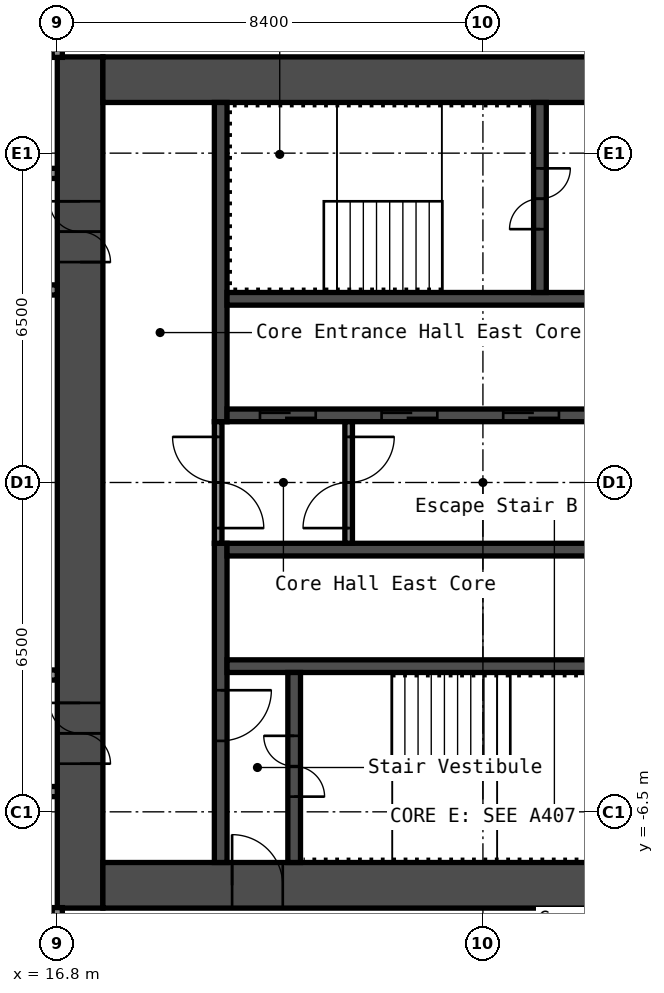
"""IFC4 building model, lengths in metres.
Left out: names, types, materials, properties, quantities, classifications, styles, units other than length and angle.
Written with IfcOpenShell. Run it as: python <this file> out.ifc"""

import sys

from ifc_helpers import new_model, si_unit, direction, frame, frame_2d, origin, place, context, subcontext, project, spatial, rectangle, extrude, element, fill, save


model = new_model("IFC4")
c1 = context("Model", 3, precision=1e-05, world=origin(), true_north=direction((0.0, 1.0)))
c2 = subcontext(c1, "Body", "Model", "MODEL_VIEW")
j1 = project(units=[si_unit("LENGTHUNIT", "METRE"), si_unit("PLANEANGLEUNIT", "RADIAN")], contexts=[c1])
p1 = place(None, origin())
s1 = spatial("IfcSite", under=j1, at=p1, CompositionType="ELEMENT")
p2 = place(p1, origin())
s2 = spatial("IfcBuilding", under=s1, at=p2, CompositionType="ELEMENT")
p3 = place(p2, frame((0.0, 0.0, 51.8)))
s3 = spatial("IfcBuildingStorey", under=s2, at=p3, CompositionType="ELEMENT", Elevation=51.8)
p4 = place(p3, frame((17.25, -8.4, 0.0), z_axis=(0.0, 0.0, 1.0), x_axis=(0.0, 1.0, 0.0)))
e1 = element("IfcWall", 1, at=p4, inside=s3, PredefinedType="SHEAR", context=c2, shape_type="SweptSolid", body=[
    extrude(rectangle(XDim=16.8, YDim=0.9, at=frame_2d((8.4, 0.0))), origin(), (0.0, 0.0, 1.0), 2.8),
])
p5 = place(p4, frame((12.75, 0.0, 0.0)))
e2 = element("IfcOpeningElement", 2, at=p5, cuts=e1, PredefinedType="OPENING", context=c2, shape_type="SweptSolid", body=[
    extrude(rectangle(XDim=1.2, YDim=2.1, at=frame_2d((0.6, 1.05))), frame((0.0, 0.46, 0.0), z_axis=(0.0, -1.0, 0.0), x_axis=(1.0, 0.0, 0.0)), (0.0, 0.0, 1.0), 0.92),
])
p6 = place(p4, frame((2.85, 0.0, 0.0)))
e3 = element("IfcOpeningElement", 3, at=p6, cuts=e1, PredefinedType="OPENING", context=c2, shape_type="SweptSolid", body=[
    extrude(rectangle(XDim=1.2, YDim=2.1, at=frame_2d((0.6, 1.05))), frame((0.0, 0.46, 0.0), z_axis=(0.0, -1.0, 0.0), x_axis=(1.0, 0.0, 0.0)), (0.0, 0.0, 1.0), 0.92),
])
p7 = place(p3, frame((17.7, 7.95, 0.0), z_axis=(0.0, 0.0, 1.0), x_axis=(1.0, 0.0, 0.0)))
e4 = element("IfcWall", 4, at=p7, inside=s3, PredefinedType="SHEAR", context=c2, shape_type="SweptSolid", body=[
    extrude(rectangle(XDim=15.0, YDim=0.9, at=frame_2d((7.5, 0.0))), origin(), (0.0, 0.0, 1.0), 2.8),
])
p8 = place(p7, frame((10.4, 0.0, 0.0)))
e5 = element("IfcOpeningElement", 5, at=p8, cuts=e4, PredefinedType="OPENING", context=c2, shape_type="SweptSolid", body=[
    extrude(rectangle(XDim=1.2, YDim=2.1, at=frame_2d((0.6, 1.05))), frame((0.0, 0.46, 0.0), z_axis=(0.0, -1.0, 0.0), x_axis=(1.0, 0.0, 0.0)), (0.0, 0.0, 1.0), 0.92),
])
p9 = place(p7, frame((13.35, 0.0, 0.0)))
e6 = element("IfcOpeningElement", 6, at=p9, cuts=e4, PredefinedType="OPENING", context=c2, shape_type="SweptSolid", body=[
    extrude(rectangle(XDim=0.9, YDim=2.1, at=frame_2d((0.45, 1.05))), frame((0.0, 0.46, 0.0), z_axis=(0.0, -1.0, 0.0), x_axis=(1.0, 0.0, 0.0)), (0.0, 0.0, 1.0), 0.92),
])
p10 = place(p3, frame((17.7, -7.95, 0.0), z_axis=(0.0, 0.0, 1.0), x_axis=(1.0, 0.0, 0.0)))
e7 = element("IfcWall", 7, at=p10, inside=s3, PredefinedType="SHEAR", context=c2, shape_type="SweptSolid", body=[
    extrude(rectangle(XDim=15.0, YDim=0.9, at=frame_2d((7.5, 0.0))), origin(), (0.0, 0.0, 1.0), 2.8),
])
p11 = place(p10, frame((2.55, 0.0, 0.0)))
e8 = element("IfcOpeningElement", 8, at=p11, cuts=e7, PredefinedType="OPENING", context=c2, shape_type="SweptSolid", body=[
    extrude(rectangle(XDim=1.0, YDim=2.1, at=frame_2d((0.5, 1.05))), frame((0.0, 0.46, 0.0), z_axis=(0.0, -1.0, 0.0), x_axis=(1.0, 0.0, 0.0)), (0.0, 0.0, 1.0), 0.92),
])
p12 = place(p3, frame((20.025, 1.2, 0.0), z_axis=(0.0, 0.0, 1.0), x_axis=(0.0, 1.0, 0.0)))
e9 = element("IfcWall", 9, at=p12, inside=s3, PredefinedType="SHEAR", context=c2, shape_type="SweptSolid", body=[
    extrude(rectangle(XDim=6.3, YDim=0.25, at=frame_2d((3.15, 0.0))), origin(), (0.0, 0.0, 1.0), 2.8),
])
p13 = place(p3, frame((20.025, -7.5, 0.0), z_axis=(0.0, 0.0, 1.0), x_axis=(0.0, 1.0, 0.0)))
e10 = element("IfcWall", 10, at=p13, inside=s3, PredefinedType="SHEAR", context=c2, shape_type="SweptSolid", body=[
    extrude(rectangle(XDim=6.3, YDim=0.25, at=frame_2d((3.15, 0.0))), origin(), (0.0, 0.0, 1.0), 2.8),
])
p14 = place(p13, frame((2.4, 0.0, 0.0)))
e11 = element("IfcOpeningElement", 11, at=p14, cuts=e10, PredefinedType="OPENING", context=c2, shape_type="SweptSolid", body=[
    extrude(rectangle(XDim=1.0, YDim=2.1, at=frame_2d((0.5, 1.05))), frame((0.0, 0.135, 0.0), z_axis=(0.0, -1.0, 0.0), x_axis=(1.0, 0.0, 0.0)), (0.0, 0.0, 1.0), 0.27),
])
p15 = place(p3, frame((20.15, 1.325, 0.0), z_axis=(0.0, 0.0, 1.0), x_axis=(1.0, 0.0, 0.0)))
e12 = element("IfcWall", 12, at=p15, inside=s3, PredefinedType="SHEAR", context=c2, shape_type="SweptSolid", body=[
    extrude(rectangle(XDim=7.5, YDim=0.25, at=frame_2d((3.75, 0.0))), origin(), (0.0, 0.0, 1.0), 2.8),
])
p16 = place(p15, frame((0.65, 0.0, 0.0)))
e13 = element("IfcOpeningElement", 13, at=p16, cuts=e12, PredefinedType="OPENING", context=c2, shape_type="SweptSolid", body=[
    extrude(rectangle(XDim=1.1, YDim=2.1, at=frame_2d((0.55, 1.05))), frame((0.0, 0.135, 0.0), z_axis=(0.0, -1.0, 0.0), x_axis=(1.0, 0.0, 0.0)), (0.0, 0.0, 1.0), 0.27),
])
p17 = place(p15, frame((3.05, 0.0, 0.0)))
e14 = element("IfcOpeningElement", 14, at=p17, cuts=e12, PredefinedType="OPENING", context=c2, shape_type="SweptSolid", body=[
    extrude(rectangle(XDim=1.1, YDim=2.1, at=frame_2d((0.55, 1.05))), frame((0.0, 0.135, 0.0), z_axis=(0.0, -1.0, 0.0), x_axis=(1.0, 0.0, 0.0)), (0.0, 0.0, 1.0), 0.27),
])
p18 = place(p15, frame((5.45, 0.0, 0.0)))
e15 = element("IfcOpeningElement", 15, at=p18, cuts=e12, PredefinedType="OPENING", context=c2, shape_type="SweptSolid", body=[
    extrude(rectangle(XDim=1.1, YDim=2.1, at=frame_2d((0.55, 1.05))), frame((0.0, 0.135, 0.0), z_axis=(0.0, -1.0, 0.0), x_axis=(1.0, 0.0, 0.0)), (0.0, 0.0, 1.0), 0.27),
])
p19 = place(p3, frame((20.15, 3.625, 0.0), z_axis=(0.0, 0.0, 1.0), x_axis=(1.0, 0.0, 0.0)))
e16 = element("IfcWall", 16, at=p19, inside=s3, PredefinedType="SHEAR", context=c2, shape_type="SweptSolid", body=[
    extrude(rectangle(XDim=7.5, YDim=0.25, at=frame_2d((3.75, 0.0))), origin(), (0.0, 0.0, 1.0), 2.8),
])
p20 = place(p3, frame((26.325, 3.75, 0.0), z_axis=(0.0, 0.0, 1.0), x_axis=(0.0, 1.0, 0.0)))
e17 = element("IfcWall", 17, at=p20, inside=s3, PredefinedType="SHEAR", context=c2, shape_type="SweptSolid", body=[
    extrude(rectangle(XDim=3.75, YDim=0.25, at=frame_2d((1.875, 0.0))), origin(), (0.0, 0.0, 1.0), 2.8),
])
p21 = place(p20, frame((1.25, 0.0, 0.0)))
e18 = element("IfcOpeningElement", 18, at=p21, cuts=e17, PredefinedType="OPENING", context=c2, shape_type="SweptSolid", body=[
    extrude(rectangle(XDim=1.2, YDim=2.1, at=frame_2d((0.6, 1.05))), frame((0.0, 0.135, 0.0), z_axis=(0.0, -1.0, 0.0), x_axis=(1.0, 0.0, 0.0)), (0.0, 0.0, 1.0), 0.27),
])
for number, where, z_axis, x_axis in (
    (19, (20.15, -1.325, 0.0), (0.0, 0.0, 1.0), (1.0, 0.0, 0.0)),
    (20, (20.15, -3.625, 0.0), (0.0, 0.0, 1.0), (1.0, 0.0, 0.0)),
):
    element("IfcWall", number, at=place(p3, frame(where, z_axis=z_axis, x_axis=x_axis)), inside=s3, PredefinedType="SHEAR", context=c2, shape_type="SweptSolid", body=[
        extrude(rectangle(XDim=7.5, YDim=0.25, at=frame_2d((3.75, 0.0))), origin(), (0.0, 0.0, 1.0), 2.8),
    ])
p22 = place(p3, frame((21.475, -7.5, 0.0), z_axis=(0.0, 0.0, 1.0), x_axis=(0.0, 1.0, 0.0)))
e21 = element("IfcWall", 21, at=p22, inside=s3, PredefinedType="SHEAR", context=c2, shape_type="SweptSolid", body=[
    extrude(rectangle(XDim=3.75, YDim=0.25, at=frame_2d((1.875, 0.0))), origin(), (0.0, 0.0, 1.0), 2.8),
])
p23 = place(p22, frame((1.3, 0.0, 0.0)))
e22 = element("IfcOpeningElement", 22, at=p23, cuts=e21, PredefinedType="OPENING", context=c2, shape_type="SweptSolid", body=[
    extrude(rectangle(XDim=1.2, YDim=2.1, at=frame_2d((0.6, 1.05))), frame((0.0, 0.135, 0.0), z_axis=(0.0, -1.0, 0.0), x_axis=(1.0, 0.0, 0.0)), (0.0, 0.0, 1.0), 0.27),
])
p24 = place(p3, frame((19.975, -1.2, 0.0), z_axis=(0.0, 0.0, 1.0), x_axis=(0.0, 1.0, 0.0)))
e23 = element("IfcWall", 23, at=p24, inside=s3, PredefinedType="PARTITIONING", context=c2, shape_type="SweptSolid", body=[
    extrude(rectangle(XDim=2.4, YDim=0.15, at=frame_2d((1.2, 0.0))), origin(), (0.0, 0.0, 1.0), 2.8),
])
p25 = place(p24, frame((0.3, 0.0, 0.0)))
e24 = element("IfcOpeningElement", 24, at=p25, cuts=e23, PredefinedType="OPENING", context=c2, shape_type="SweptSolid", body=[
    extrude(rectangle(XDim=1.8, YDim=2.1, at=frame_2d((0.9, 1.05))), frame((0.0, 0.085, 0.0), z_axis=(0.0, -1.0, 0.0), x_axis=(1.0, 0.0, 0.0)), (0.0, 0.0, 1.0), 0.17),
])
p26 = place(p3, frame((22.55, -1.2, 0.0), z_axis=(0.0, 0.0, 1.0), x_axis=(0.0, 1.0, 0.0)))
e25 = element("IfcWall", 25, at=p26, inside=s3, PredefinedType="PARTITIONING", context=c2, shape_type="SweptSolid", body=[
    extrude(rectangle(XDim=2.4, YDim=0.15, at=frame_2d((1.2, 0.0))), origin(), (0.0, 0.0, 1.0), 2.8),
])
p27 = place(p26, frame((0.3, 0.0, 0.0)))
e26 = element("IfcOpeningElement", 26, at=p27, cuts=e25, PredefinedType="OPENING", context=c2, shape_type="SweptSolid", body=[
    extrude(rectangle(XDim=1.8, YDim=2.1, at=frame_2d((0.9, 1.05))), frame((0.0, 0.085, 0.0), z_axis=(0.0, -1.0, 0.0), x_axis=(1.0, 0.0, 0.0)), (0.0, 0.0, 1.0), 0.17),
])
p28 = place(p3, frame((-16.8, -6.1, 0.0), z_axis=(0.0, 0.0, 1.0), x_axis=(1.0, 0.0, 0.0)))
e27 = element("IfcWall", 27, at=p28, inside=s3, PredefinedType="PARTITIONING", context=c2, shape_type="SweptSolid", body=[
    extrude(rectangle(XDim=33.6, YDim=0.2, at=frame_2d((16.8, 0.0))), origin(), (0.0, 0.0, 1.0), 2.8),
])
p29 = place(p28, frame((2.0, 0.0, 0.0)))
e28 = element("IfcOpeningElement", 28, at=p29, cuts=e27, PredefinedType="OPENING", context=c2, shape_type="SweptSolid", body=[
    extrude(rectangle(XDim=1.0, YDim=2.1, at=frame_2d((0.5, 1.05))), frame((0.0, 0.11, 0.0), z_axis=(0.0, -1.0, 0.0), x_axis=(1.0, 0.0, 0.0)), (0.0, 0.0, 1.0), 0.22),
])
p30 = place(p28, frame((9.46, 0.0, 0.0)))
e29 = element("IfcOpeningElement", 29, at=p30, cuts=e27, PredefinedType="OPENING", context=c2, shape_type="SweptSolid", body=[
    extrude(rectangle(XDim=0.9, YDim=2.1, at=frame_2d((0.45, 1.05))), frame((0.0, 0.11, 0.0), z_axis=(0.0, -1.0, 0.0), x_axis=(1.0, 0.0, 0.0)), (0.0, 0.0, 1.0), 0.22),
])
p31 = place(p28, frame((13.66, 0.0, 0.0)))
e30 = element("IfcOpeningElement", 30, at=p31, cuts=e27, PredefinedType="OPENING", context=c2, shape_type="SweptSolid", body=[
    extrude(rectangle(XDim=0.9, YDim=2.1, at=frame_2d((0.45, 1.05))), frame((0.0, 0.11, 0.0), z_axis=(0.0, -1.0, 0.0), x_axis=(1.0, 0.0, 0.0)), (0.0, 0.0, 1.0), 0.22),
])
p32 = place(p28, frame((18.8, 0.0, 0.0)))
e31 = element("IfcOpeningElement", 31, at=p32, cuts=e27, PredefinedType="OPENING", context=c2, shape_type="SweptSolid", body=[
    extrude(rectangle(XDim=1.0, YDim=2.1, at=frame_2d((0.5, 1.05))), frame((0.0, 0.11, 0.0), z_axis=(0.0, -1.0, 0.0), x_axis=(1.0, 0.0, 0.0)), (0.0, 0.0, 1.0), 0.22),
])
p33 = place(p28, frame((27.2, 0.0, 0.0)))
e32 = element("IfcOpeningElement", 32, at=p33, cuts=e27, PredefinedType="OPENING", context=c2, shape_type="SweptSolid", body=[
    extrude(rectangle(XDim=1.0, YDim=2.1, at=frame_2d((0.5, 1.05))), frame((0.0, 0.11, 0.0), z_axis=(0.0, -1.0, 0.0), x_axis=(1.0, 0.0, 0.0)), (0.0, 0.0, 1.0), 0.22),
])
p34 = place(p3, frame((-16.8, -3.8, 0.0), z_axis=(0.0, 0.0, 1.0), x_axis=(1.0, 0.0, 0.0)))
e33 = element("IfcWall", 33, at=p34, inside=s3, PredefinedType="PARTITIONING", context=c2, shape_type="SweptSolid", body=[
    extrude(rectangle(XDim=33.6, YDim=0.2, at=frame_2d((16.8, 0.0))), origin(), (0.0, 0.0, 1.0), 2.8),
])
p35 = place(p34, frame((9.88, 0.0, 0.0)))
e34 = element("IfcOpeningElement", 34, at=p35, cuts=e33, PredefinedType="OPENING", context=c2, shape_type="SweptSolid", body=[
    extrude(rectangle(XDim=0.9, YDim=2.1, at=frame_2d((0.45, 1.05))), frame((0.0, 0.11, 0.0), z_axis=(0.0, -1.0, 0.0), x_axis=(1.0, 0.0, 0.0)), (0.0, 0.0, 1.0), 0.22),
])
p36 = place(p34, frame((14.08, 0.0, 0.0)))
e35 = element("IfcOpeningElement", 35, at=p36, cuts=e33, PredefinedType="OPENING", context=c2, shape_type="SweptSolid", body=[
    extrude(rectangle(XDim=0.9, YDim=2.1, at=frame_2d((0.45, 1.05))), frame((0.0, 0.11, 0.0), z_axis=(0.0, -1.0, 0.0), x_axis=(1.0, 0.0, 0.0)), (0.0, 0.0, 1.0), 0.22),
])
p37 = place(p34, frame((27.355, 0.0, 0.0)))
e36 = element("IfcOpeningElement", 36, at=p37, cuts=e33, PredefinedType="OPENING", context=c2, shape_type="SweptSolid", body=[
    extrude(rectangle(XDim=0.9, YDim=2.1, at=frame_2d((0.45, 1.05))), frame((0.0, 0.11, 0.0), z_axis=(0.0, -1.0, 0.0), x_axis=(1.0, 0.0, 0.0)), (0.0, 0.0, 1.0), 0.22),
])
p38 = place(p34, frame((31.555, 0.0, 0.0)))
e37 = element("IfcOpeningElement", 37, at=p38, cuts=e33, PredefinedType="OPENING", context=c2, shape_type="SweptSolid", body=[
    extrude(rectangle(XDim=0.9, YDim=2.1, at=frame_2d((0.45, 1.05))), frame((0.0, 0.11, 0.0), z_axis=(0.0, -1.0, 0.0), x_axis=(1.0, 0.0, 0.0)), (0.0, 0.0, 1.0), 0.22),
])
p39 = place(p3, frame((-16.8, 3.8, 0.0), z_axis=(0.0, 0.0, 1.0), x_axis=(1.0, 0.0, 0.0)))
e38 = element("IfcWall", 38, at=p39, inside=s3, PredefinedType="PARTITIONING", context=c2, shape_type="SweptSolid", body=[
    extrude(rectangle(XDim=33.6, YDim=0.2, at=frame_2d((16.8, 0.0))), origin(), (0.0, 0.0, 1.0), 2.8),
])
p40 = place(p39, frame((2.24, 0.0, 0.0)))
e39 = element("IfcOpeningElement", 39, at=p40, cuts=e38, PredefinedType="OPENING", context=c2, shape_type="SweptSolid", body=[
    extrude(rectangle(XDim=0.9, YDim=2.1, at=frame_2d((0.45, 1.05))), frame((0.0, 0.11, 0.0), z_axis=(0.0, -1.0, 0.0), x_axis=(1.0, 0.0, 0.0)), (0.0, 0.0, 1.0), 0.22),
])
p41 = place(p39, frame((6.44, 0.0, 0.0)))
e40 = element("IfcOpeningElement", 40, at=p41, cuts=e38, PredefinedType="OPENING", context=c2, shape_type="SweptSolid", body=[
    extrude(rectangle(XDim=0.9, YDim=2.1, at=frame_2d((0.45, 1.05))), frame((0.0, 0.11, 0.0), z_axis=(0.0, -1.0, 0.0), x_axis=(1.0, 0.0, 0.0)), (0.0, 0.0, 1.0), 0.22),
])
p42 = place(p39, frame((18.03, 0.0, 0.0)))
e41 = element("IfcOpeningElement", 41, at=p42, cuts=e38, PredefinedType="OPENING", context=c2, shape_type="SweptSolid", body=[
    extrude(rectangle(XDim=0.9, YDim=2.1, at=frame_2d((0.45, 1.05))), frame((0.0, 0.11, 0.0), z_axis=(0.0, -1.0, 0.0), x_axis=(1.0, 0.0, 0.0)), (0.0, 0.0, 1.0), 0.22),
])
p43 = place(p39, frame((22.23, 0.0, 0.0)))
e42 = element("IfcOpeningElement", 42, at=p43, cuts=e38, PredefinedType="OPENING", context=c2, shape_type="SweptSolid", body=[
    extrude(rectangle(XDim=0.9, YDim=2.1, at=frame_2d((0.45, 1.05))), frame((0.0, 0.11, 0.0), z_axis=(0.0, -1.0, 0.0), x_axis=(1.0, 0.0, 0.0)), (0.0, 0.0, 1.0), 0.22),
])
p44 = place(p3, frame((-16.8, 6.1, 0.0), z_axis=(0.0, 0.0, 1.0), x_axis=(1.0, 0.0, 0.0)))
e43 = element("IfcWall", 43, at=p44, inside=s3, PredefinedType="PARTITIONING", context=c2, shape_type="SweptSolid", body=[
    extrude(rectangle(XDim=33.6, YDim=0.2, at=frame_2d((16.8, 0.0))), origin(), (0.0, 0.0, 1.0), 2.8),
])
p45 = place(p44, frame((5.4, 0.0, 0.0)))
e44 = element("IfcOpeningElement", 44, at=p45, cuts=e43, PredefinedType="OPENING", context=c2, shape_type="SweptSolid", body=[
    extrude(rectangle(XDim=1.0, YDim=2.1, at=frame_2d((0.5, 1.05))), frame((0.0, 0.11, 0.0), z_axis=(0.0, -1.0, 0.0), x_axis=(1.0, 0.0, 0.0)), (0.0, 0.0, 1.0), 0.22),
])
p46 = place(p44, frame((10.3, 0.0, 0.0)))
e45 = element("IfcOpeningElement", 45, at=p46, cuts=e43, PredefinedType="OPENING", context=c2, shape_type="SweptSolid", body=[
    extrude(rectangle(XDim=0.9, YDim=2.1, at=frame_2d((0.45, 1.05))), frame((0.0, 0.11, 0.0), z_axis=(0.0, -1.0, 0.0), x_axis=(1.0, 0.0, 0.0)), (0.0, 0.0, 1.0), 0.22),
])
p47 = place(p44, frame((14.5, 0.0, 0.0)))
e46 = element("IfcOpeningElement", 46, at=p47, cuts=e43, PredefinedType="OPENING", context=c2, shape_type="SweptSolid", body=[
    extrude(rectangle(XDim=0.9, YDim=2.1, at=frame_2d((0.45, 1.05))), frame((0.0, 0.11, 0.0), z_axis=(0.0, -1.0, 0.0), x_axis=(1.0, 0.0, 0.0)), (0.0, 0.0, 1.0), 0.22),
])
p48 = place(p44, frame((18.62, 0.0, 0.0)))
e47 = element("IfcOpeningElement", 47, at=p48, cuts=e43, PredefinedType="OPENING", context=c2, shape_type="SweptSolid", body=[
    extrude(rectangle(XDim=0.9, YDim=2.1, at=frame_2d((0.45, 1.05))), frame((0.0, 0.11, 0.0), z_axis=(0.0, -1.0, 0.0), x_axis=(1.0, 0.0, 0.0)), (0.0, 0.0, 1.0), 0.22),
])
p49 = place(p44, frame((22.82, 0.0, 0.0)))
e48 = element("IfcOpeningElement", 48, at=p49, cuts=e43, PredefinedType="OPENING", context=c2, shape_type="SweptSolid", body=[
    extrude(rectangle(XDim=0.9, YDim=2.1, at=frame_2d((0.45, 1.05))), frame((0.0, 0.11, 0.0), z_axis=(0.0, -1.0, 0.0), x_axis=(1.0, 0.0, 0.0)), (0.0, 0.0, 1.0), 0.22),
])
p50 = place(p44, frame((27.2, 0.0, 0.0)))
e49 = element("IfcOpeningElement", 49, at=p50, cuts=e43, PredefinedType="OPENING", context=c2, shape_type="SweptSolid", body=[
    extrude(rectangle(XDim=1.0, YDim=2.1, at=frame_2d((0.5, 1.05))), frame((0.0, 0.11, 0.0), z_axis=(0.0, -1.0, 0.0), x_axis=(1.0, 0.0, 0.0)), (0.0, 0.0, 1.0), 0.22),
])
for number, where, z_axis, x_axis in (
    (50, (16.8, -20.3, 0.0), (0.0, 0.0, 1.0), (0.0, 1.0, 0.0)),
    (51, (16.8, 8.39, 0.0), (0.0, 0.0, 1.0), (0.0, 1.0, 0.0)),
):
    element("IfcWall", number, at=place(p3, frame(where, z_axis=z_axis, x_axis=x_axis)), inside=s3, PredefinedType="PARTITIONING", context=c2, shape_type="SweptSolid", body=[
        extrude(rectangle(XDim=11.91, YDim=0.2, at=frame_2d((5.955, 0.0))), origin(), (0.0, 0.0, 1.0), 2.8),
    ])
p51 = place(p5, origin())
e52 = element("IfcDoor", 52, at=p51, inside=s3, OperationType="DOUBLE_DOOR_SINGLE_SWING", PredefinedType="DOOR", context=c2, shape_type="SweptSolid", body=[
    extrude(rectangle(XDim=1.2, YDim=2.1, at=frame_2d((0.6, 1.05))), frame((0.0, 0.025, 0.0), z_axis=(0.0, -1.0, 0.0), x_axis=(1.0, 0.0, 0.0)), (0.0, 0.0, 1.0), 0.05),
])
fill(e2, e52)
p52 = place(p6, origin())
e53 = element("IfcDoor", 53, at=p52, inside=s3, OperationType="DOUBLE_DOOR_SINGLE_SWING", PredefinedType="DOOR", context=c2, shape_type="SweptSolid", body=[
    extrude(rectangle(XDim=1.2, YDim=2.1, at=frame_2d((0.6, 1.05))), frame((0.0, 0.025, 0.0), z_axis=(0.0, -1.0, 0.0), x_axis=(1.0, 0.0, 0.0)), (0.0, 0.0, 1.0), 0.05),
])
fill(e3, e53)
p53 = place(p11, origin())
e54 = element("IfcDoor", 54, at=p53, inside=s3, OperationType="SINGLE_SWING_RIGHT", PredefinedType="DOOR", context=c2, shape_type="SweptSolid", body=[
    extrude(rectangle(XDim=1.0, YDim=2.1, at=frame_2d((0.5, 1.05))), frame((0.0, 0.025, 0.0), z_axis=(0.0, -1.0, 0.0), x_axis=(1.0, 0.0, 0.0)), (0.0, 0.0, 1.0), 0.05),
])
fill(e8, e54)
p54 = place(p21, origin())
e55 = element("IfcDoor", 55, at=p54, inside=s3, OperationType="DOUBLE_DOOR_SINGLE_SWING", PredefinedType="DOOR", context=c2, shape_type="SweptSolid", body=[
    extrude(rectangle(XDim=1.2, YDim=2.1, at=frame_2d((0.6, 1.05))), frame((0.0, 0.025, 0.0), z_axis=(0.0, -1.0, 0.0), x_axis=(1.0, 0.0, 0.0)), (0.0, 0.0, 1.0), 0.05),
])
fill(e18, e55)
p55 = place(p23, origin())
e56 = element("IfcDoor", 56, at=p55, inside=s3, OperationType="DOUBLE_DOOR_SINGLE_SWING", PredefinedType="DOOR", context=c2, shape_type="SweptSolid", body=[
    extrude(rectangle(XDim=1.2, YDim=2.1, at=frame_2d((0.6, 1.05))), frame((0.0, 0.025, 0.0), z_axis=(0.0, -1.0, 0.0), x_axis=(1.0, 0.0, 0.0)), (0.0, 0.0, 1.0), 0.05),
])
fill(e22, e56)
p56 = place(p14, origin())
e57 = element("IfcDoor", 57, at=p56, inside=s3, OperationType="SINGLE_SWING_RIGHT", PredefinedType="DOOR", context=c2, shape_type="SweptSolid", body=[
    extrude(rectangle(XDim=1.0, YDim=2.1, at=frame_2d((0.5, 1.05))), frame((0.0, 0.025, 0.0), z_axis=(0.0, -1.0, 0.0), x_axis=(1.0, 0.0, 0.0)), (0.0, 0.0, 1.0), 0.05),
])
fill(e11, e57)
p57 = place(p25, origin())
e58 = element("IfcDoor", 58, at=p57, inside=s3, OperationType="DOUBLE_DOOR_SINGLE_SWING", PredefinedType="DOOR", context=c2, shape_type="SweptSolid", body=[
    extrude(rectangle(XDim=1.8, YDim=2.1, at=frame_2d((0.9, 1.05))), frame((0.0, 0.025, 0.0), z_axis=(0.0, -1.0, 0.0), x_axis=(1.0, 0.0, 0.0)), (0.0, 0.0, 1.0), 0.05),
])
fill(e24, e58)
p58 = place(p27, origin())
e59 = element("IfcDoor", 59, at=p58, inside=s3, OperationType="DOUBLE_DOOR_SINGLE_SWING", PredefinedType="DOOR", context=c2, shape_type="SweptSolid", body=[
    extrude(rectangle(XDim=1.8, YDim=2.1, at=frame_2d((0.9, 1.05))), frame((0.0, 0.025, 0.0), z_axis=(0.0, -1.0, 0.0), x_axis=(1.0, 0.0, 0.0)), (0.0, 0.0, 1.0), 0.05),
])
fill(e26, e59)
p59 = place(p16, origin())
e60 = element("IfcDoor", 60, at=p59, inside=s3, OperationType="DOUBLE_DOOR_SLIDING", PredefinedType="DOOR", context=c2, shape_type="SweptSolid", body=[
    extrude(rectangle(XDim=1.1, YDim=2.1, at=frame_2d((0.55, 1.05))), frame((0.0, 0.025, 0.0), z_axis=(0.0, -1.0, 0.0), x_axis=(1.0, 0.0, 0.0)), (0.0, 0.0, 1.0), 0.05),
])
fill(e13, e60)
p60 = place(p17, origin())
e61 = element("IfcDoor", 61, at=p60, inside=s3, OperationType="DOUBLE_DOOR_SLIDING", PredefinedType="DOOR", context=c2, shape_type="SweptSolid", body=[
    extrude(rectangle(XDim=1.1, YDim=2.1, at=frame_2d((0.55, 1.05))), frame((0.0, 0.025, 0.0), z_axis=(0.0, -1.0, 0.0), x_axis=(1.0, 0.0, 0.0)), (0.0, 0.0, 1.0), 0.05),
])
fill(e14, e61)
p61 = place(p18, origin())
e62 = element("IfcDoor", 62, at=p61, inside=s3, OperationType="DOUBLE_DOOR_SLIDING", PredefinedType="DOOR", context=c2, shape_type="SweptSolid", body=[
    extrude(rectangle(XDim=1.1, YDim=2.1, at=frame_2d((0.55, 1.05))), frame((0.0, 0.025, 0.0), z_axis=(0.0, -1.0, 0.0), x_axis=(1.0, 0.0, 0.0)), (0.0, 0.0, 1.0), 0.05),
])
fill(e15, e62)
save(model, sys.argv[1])
